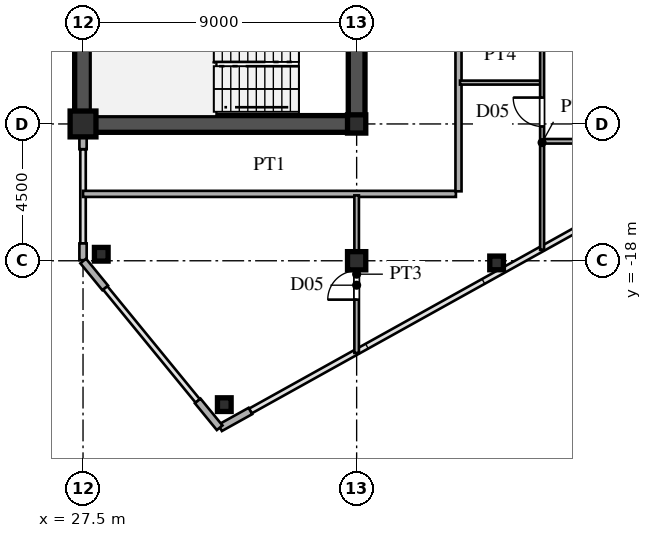
"""IFC4 building model, lengths in metres.
Left out: names, types, materials, properties, quantities, classifications, styles, units other than length and angle.
Written with IfcOpenShell. Run it as: python <this file> out.ifc"""

import sys

from ifc_helpers import new_model, si_unit, direction, frame, frame_2d, origin, origin_2d, place, context, subcontext, project, spatial, rectangle, hollow_rectangle, i_section, extrude, source, transform, mapped, element, fill, save


model = new_model("IFC4")
c1 = context("Model", 3, precision=1e-05, world=origin(), true_north=direction((0.0, 1.0)))
c2 = subcontext(c1, "Body", "Model", "MODEL_VIEW")
j1 = project(units=[si_unit("LENGTHUNIT", "METRE"), si_unit("PLANEANGLEUNIT", "RADIAN")], contexts=[c1])
p1 = place(None, origin())
s1 = spatial("IfcSite", under=j1, at=p1, CompositionType="ELEMENT")
p2 = place(p1, origin())
s2 = spatial("IfcBuilding", under=s1, at=p2, CompositionType="ELEMENT")
p3 = place(p2, frame((0.0, 0.0, 170.7)))
s3 = spatial("IfcBuildingStorey", under=s2, at=p3, CompositionType="ELEMENT", Elevation=170.7)
m1 = source(origin(), c2, "Body", "SweptSolid", [
    extrude(hollow_rectangle(XDim=0.85, YDim=0.85, WallThickness=0.036, at=origin_2d()), origin(), (0.0, 0.0, 1.0), 3.6),
])
p4 = place(p3, frame((27.5, -13.5, 0.0), z_axis=(0.0, 0.0, 1.0), x_axis=(1.0, 0.0, 0.0)))
e1 = element("IfcColumn", 1, at=p4, inside=s3, PredefinedType="COLUMN", context=c2, shape_type="MappedRepresentation", body=[
    mapped(m1, transform((0.0, 0.0, 0.0), scale=1.0)),
])
m2 = source(origin(), c2, "Body", "SweptSolid", [
    extrude(i_section(OverallWidth=0.6, OverallDepth=0.6, WebThickness=0.025, FlangeThickness=0.04, at=origin_2d()), origin(), (0.0, 0.0, 1.0), 3.6),
])
for number, where, z_axis, x_axis in (
    (2, (36.5, -18.0, 0.0), (0.0, 0.0, 1.0), (1.0, 0.0, 0.0)),
    (3, (36.5, -13.5, 0.0), (0.0, 0.0, 1.0), (1.0, 0.0, 0.0)),
):
    element("IfcColumn", number, at=place(p3, frame(where, z_axis=z_axis, x_axis=x_axis)), inside=s3, PredefinedType="COLUMN", context=c2, shape_type="MappedRepresentation", body=[
        mapped(m2, transform((0.0, 0.0, 0.0), scale=1.0)),
    ])
m3 = source(origin(), c2, "Body", "SweptSolid", [
    extrude(hollow_rectangle(XDim=0.45, YDim=0.45, WallThickness=0.018, at=origin_2d()), origin(), (0.0, 0.0, 1.0), 3.6),
])
for number, where, z_axis, x_axis in (
    (4, (32.147, -22.732, 0.0), (0.0, 0.0, 1.0), (1.0, 0.0, 0.0)),
    (5, (28.1, -17.786, 0.0), (0.0, 0.0, 1.0), (1.0, 0.0, 0.0)),
    (6, (41.104, -18.071, 0.0), (0.0, 0.0, 1.0), (1.0, 0.0, 0.0)),
):
    element("IfcColumn", number, at=place(p3, frame(where, z_axis=z_axis, x_axis=x_axis)), inside=s3, PredefinedType="COLUMN", context=c2, shape_type="MappedRepresentation", body=[
        mapped(m3, transform((0.0, 0.0, 0.0), scale=1.0)),
    ])
p5 = place(p3, frame((32.009, -23.495, 0.0), z_axis=(0.0, 0.0, 1.0), x_axis=(0.87385402111, 0.486188389196, 0.0)))
e7 = element("IfcWall", 7, at=p5, inside=s3, PredefinedType="SOLIDWALL", context=c2, shape_type="SweptSolid", body=[
    extrude(rectangle(XDim=1.14, YDim=0.24, at=frame_2d((0.57, 0.0))), origin(), (0.0, 0.0, 1.0), 3.38),
])
p6 = place(p3, frame((27.5, -17.98, 0.0), z_axis=(0.0, 0.0, 1.0), x_axis=(0.0, 1.0, 0.0)))
e8 = element("IfcWall", 8, at=p6, inside=s3, PredefinedType="SOLIDWALL", context=c2, shape_type="SweptSolid", body=[
    extrude(rectangle(XDim=0.55, YDim=0.24, at=frame_2d((0.275, 0.0))), origin(), (0.0, 0.0, 1.0), 3.38),
])
p7 = place(p3, frame((27.5, -14.33, 0.0), z_axis=(0.0, 0.0, 1.0), x_axis=(0.0, 1.0, 0.0)))
e9 = element("IfcWall", 9, at=p7, inside=s3, PredefinedType="SOLIDWALL", context=c2, shape_type="SweptSolid", body=[
    extrude(rectangle(XDim=0.55, YDim=0.24, at=frame_2d((0.275, 0.0))), origin(), (0.0, 0.0, 1.0), 2.88),
])
for number, where, z_axis, x_axis in (
    (10, (27.506, -18.008, 0.0), (0.0, 0.0, 1.0), (0.633, -0.774, 0.0)),
    (11, (31.272, -22.61, 0.0), (0.0, 0.0, 1.0), (0.633, -0.774, 0.0)),
):
    element("IfcWall", number, at=place(p3, frame(where, z_axis=z_axis, x_axis=x_axis)), inside=s3, PredefinedType="SOLIDWALL", context=c2, shape_type="SweptSolid", body=[
        extrude(rectangle(XDim=1.14, YDim=0.24, at=frame_2d((0.57, 0.0))), origin(), (0.0, 0.0, 1.0), 3.38),
    ])
p8 = place(p3, frame((27.5, -13.5, 0.0), z_axis=(0.0, 0.0, 1.0), x_axis=(0.0, 1.0, 0.0)))
e12 = element("IfcWall", 12, at=p8, inside=s3, PredefinedType="SHEAR", context=c2, shape_type="SweptSolid", body=[
    extrude(rectangle(XDim=12.2, YDim=0.55, at=frame_2d((6.1, 0.0))), origin(), (0.0, 0.0, 1.0), 3.38),
])
p9 = place(p3, frame((27.5, -13.5, 0.0), z_axis=(0.0, 0.0, 1.0), x_axis=(1.0, 0.0, 0.0)))
e13 = element("IfcWall", 13, at=p9, inside=s3, PredefinedType="SHEAR", context=c2, shape_type="SweptSolid", body=[
    extrude(rectangle(XDim=9.0, YDim=0.55, at=frame_2d((4.5, 0.0))), origin(), (0.0, 0.0, 1.0), 3.38),
])
p10 = place(p3, frame((36.5, -13.65, 0.0), z_axis=(0.0, 0.0, 1.0), x_axis=(0.0, 1.0, 0.0)))
e14 = element("IfcWall", 14, at=p10, inside=s3, PredefinedType="SHEAR", context=c2, shape_type="SweptSolid", body=[
    extrude(rectangle(XDim=7.15, YDim=0.55, at=frame_2d((3.575, 0.0))), origin(), (0.0, 0.0, 1.0), 3.38),
])
p11 = place(p10, frame((4.675, 0.0, 0.0)))
e15 = element("IfcOpeningElement", 15, at=p11, cuts=e14, PredefinedType="OPENING", context=c2, shape_type="SweptSolid", body=[
    extrude(rectangle(XDim=1.15, YDim=2.2, at=frame_2d((0.575, 1.1))), frame((0.0, 0.285, 0.0), z_axis=(0.0, -1.0, 0.0), x_axis=(1.0, 0.0, 0.0)), (0.0, 0.0, 1.0), 0.57),
])
p12 = place(p3, frame((27.5, -15.8, 0.0), z_axis=(0.0, 0.0, 1.0), x_axis=(1.0, 0.0, 0.0)))
e16 = element("IfcWall", 16, at=p12, inside=s3, PredefinedType="PARTITIONING", context=c2, shape_type="SweptSolid", body=[
    extrude(rectangle(XDim=12.265, YDim=0.2, at=frame_2d((6.132, 0.0))), origin(), (0.0, 0.0, 1.0), 3.38),
])
p13 = place(p3, frame((42.65, -14.07, 0.0), z_axis=(0.0, 0.0, 1.0), x_axis=(1.0, 0.0, 0.0)))
e17 = element("IfcWall", 17, at=p13, inside=s3, PredefinedType="PARTITIONING", context=c2, shape_type="SweptSolid", body=[
    extrude(rectangle(XDim=6.341, YDim=0.15, at=frame_2d((3.17, 0.0))), origin(), (0.0, 0.0, 1.0), 3.38),
])
p14 = place(p13, frame((3.292, 0.0, 0.0)))
e18 = element("IfcOpeningElement", 18, at=p14, cuts=e17, PredefinedType="OPENING", context=c2, shape_type="SweptSolid", body=[
    extrude(rectangle(XDim=0.95, YDim=2.15, at=frame_2d((0.475, 1.075))), frame((0.0, 0.085, 0.0), z_axis=(0.0, -1.0, 0.0), x_axis=(1.0, 0.0, 0.0)), (0.0, 0.0, 1.0), 0.17),
])
p15 = place(p3, frame((39.9, -12.14, 0.0), z_axis=(0.0, 0.0, 1.0), x_axis=(1.0, 0.0, 0.0)))
e19 = element("IfcWall", 19, at=p15, inside=s3, PredefinedType="PARTITIONING", context=c2, shape_type="SweptSolid", body=[
    extrude(rectangle(XDim=2.65, YDim=0.13, at=frame_2d((1.325, 0.0))), origin(), (0.0, 0.0, 1.0), 3.38),
])
p16 = place(p3, frame((36.5, -21.032, 0.0), z_axis=(0.0, 0.0, 1.0), x_axis=(0.0, 1.0, 0.0)))
e20 = element("IfcWall", 20, at=p16, inside=s3, PredefinedType="PARTITIONING", context=c2, shape_type="SweptSolid", body=[
    extrude(rectangle(XDim=5.182, YDim=0.15, at=frame_2d((2.591, 0.0))), origin(), (0.0, 0.0, 1.0), 2.78),
])
p17 = place(p16, frame((1.754, 0.0, 0.0)))
e21 = element("IfcOpeningElement", 21, at=p17, cuts=e20, PredefinedType="OPENING", context=c2, shape_type="SweptSolid", body=[
    extrude(rectangle(XDim=0.95, YDim=2.15, at=frame_2d((0.475, 1.075))), frame((0.0, 0.085, 0.0), z_axis=(0.0, -1.0, 0.0), x_axis=(1.0, 0.0, 0.0)), (0.0, 0.0, 1.0), 0.17),
])
p18 = place(p3, frame((39.85, -15.715, 0.0), z_axis=(0.0, 0.0, 1.0), x_axis=(0.0, 1.0, 0.0)))
e22 = element("IfcWall", 22, at=p18, inside=s3, PredefinedType="PARTITIONING", context=c2, shape_type="SweptSolid", body=[
    extrude(rectangle(XDim=31.43, YDim=0.2, at=frame_2d((15.715, 0.0))), origin(), (0.0, 0.0, 1.0), 3.38),
])
p19 = place(p18, frame((6.792, 0.0, 0.0)))
e23 = element("IfcOpeningElement", 23, at=p19, cuts=e22, PredefinedType="OPENING", context=c2, shape_type="SweptSolid", body=[
    extrude(rectangle(XDim=1.05, YDim=2.25, at=frame_2d((0.525, 1.125))), frame((0.0, 0.11, 0.0), z_axis=(0.0, -1.0, 0.0), x_axis=(1.0, 0.0, 0.0)), (0.0, 0.0, 1.0), 0.22),
])
p20 = place(p18, frame((14.98, 0.0, 0.0)))
e24 = element("IfcOpeningElement", 24, at=p20, cuts=e22, PredefinedType="OPENING", context=c2, shape_type="SweptSolid", body=[
    extrude(rectangle(XDim=1.05, YDim=2.25, at=frame_2d((0.525, 1.125))), frame((0.0, 0.11, 0.0), z_axis=(0.0, -1.0, 0.0), x_axis=(1.0, 0.0, 0.0)), (0.0, 0.0, 1.0), 0.22),
])
p21 = place(p18, frame((26.59, 0.0, 0.0)))
e25 = element("IfcOpeningElement", 25, at=p21, cuts=e22, PredefinedType="OPENING", context=c2, shape_type="SweptSolid", body=[
    extrude(rectangle(XDim=1.05, YDim=2.25, at=frame_2d((0.525, 1.125))), frame((0.0, 0.11, 0.0), z_axis=(0.0, -1.0, 0.0), x_axis=(1.0, 0.0, 0.0)), (0.0, 0.0, 1.0), 0.22),
])
p22 = place(p3, frame((42.6, -17.64, 0.0), z_axis=(0.0, 0.0, 1.0), x_axis=(0.0, 1.0, 0.0)))
e26 = element("IfcWall", 26, at=p22, inside=s3, PredefinedType="PARTITIONING", context=c2, shape_type="SweptSolid", body=[
    extrude(rectangle(XDim=7.055, YDim=0.13, at=frame_2d((3.527, 0.0))), origin(), (0.0, 0.0, 1.0), 3.38),
])
p23 = place(p22, frame((4.058, 0.0, 0.0)))
e27 = element("IfcOpeningElement", 27, at=p23, cuts=e26, PredefinedType="OPENING", context=c2, shape_type="SweptSolid", body=[
    extrude(rectangle(XDim=0.95, YDim=2.15, at=frame_2d((0.475, 1.075))), frame((0.0, 0.075, 0.0), z_axis=(0.0, -1.0, 0.0), x_axis=(1.0, 0.0, 0.0)), (0.0, 0.0, 1.0), 0.15),
])
m4 = source(origin(), c2, "Body", "SweptSolid", [
    extrude(rectangle(XDim=0.95, YDim=2.15, at=frame_2d((0.475, 1.075))), frame((0.0, 0.025, 0.0), z_axis=(0.0, -1.0, 0.0), x_axis=(1.0, 0.0, 0.0)), (0.0, 0.0, 1.0), 0.05),
])
p24 = place(p17, origin())
e28 = element("IfcDoor", 28, at=p24, inside=s3, OperationType="SINGLE_SWING_LEFT", PredefinedType="DOOR", context=c2, shape_type="MappedRepresentation", body=[
    mapped(m4, transform((0.0, 0.0, 0.0), scale=1.0)),
])
fill(e21, e28)
p25 = place(p23, origin())
e29 = element("IfcDoor", 29, at=p25, inside=s3, OperationType="SINGLE_SWING_RIGHT", PredefinedType="DOOR", context=c2, shape_type="MappedRepresentation", body=[
    mapped(m4, transform((0.0, 0.0, 0.0), scale=1.0)),
])
fill(e27, e29)
save(model, sys.argv[1])
